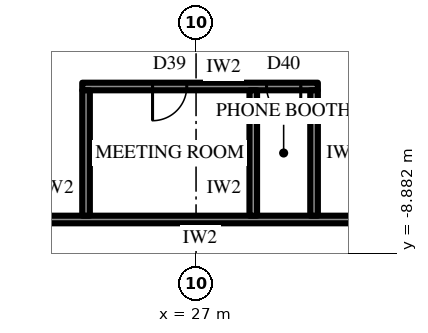
"""IFC4 building model, lengths in metres.
Left out: names, types, materials, properties, quantities, classifications, styles, units other than length and angle.
Written with IfcOpenShell. Run it as: python <this file> out.ifc"""

import sys

from ifc_helpers import new_model, si_unit, direction, frame, frame_2d, origin, place, context, subcontext, project, spatial, rectangle, extrude, element, fill, save


model = new_model("IFC4")
c1 = context("Model", 3, precision=1e-05, world=origin(), true_north=direction((0.0, 1.0)))
c2 = subcontext(c1, "Body", "Model", "MODEL_VIEW")
j1 = project(units=[si_unit("LENGTHUNIT", "METRE"), si_unit("PLANEANGLEUNIT", "RADIAN")], contexts=[c1])
p1 = place(None, origin())
s1 = spatial("IfcSite", under=j1, at=p1, CompositionType="ELEMENT")
p2 = place(p1, origin())
s2 = spatial("IfcBuilding", under=s1, at=p2, CompositionType="ELEMENT")
p3 = place(p2, frame((0.0, 0.0, 23.5)))
s3 = spatial("IfcBuildingStorey", under=s2, at=p3, CompositionType="ELEMENT", Elevation=23.5)
p4 = place(p3, frame((21.232, -30.925, 0.0), z_axis=(0.0, 0.0, 1.0), x_axis=(0.499999163675, 0.866025886636, 0.0)))
e1 = element("IfcWall", 1, at=p4, inside=s3, PredefinedType="SOLIDWALL", context=c2, shape_type="SweptSolid", body=[
    extrude(rectangle(XDim=32.332, YDim=0.3, at=frame_2d((16.166, 0.0))), origin(), (0.0, 0.0, 1.0), 2.7),
])
p5 = place(p4, frame((1.319, 0.0, 0.6)))
e2 = element("IfcOpeningElement", 2, at=p5, cuts=e1, PredefinedType="OPENING", context=c2, shape_type="SweptSolid", body=[
    extrude(rectangle(XDim=2.75, YDim=1.85, at=frame_2d((1.375, 0.925))), frame((0.0, 0.16, 0.0), z_axis=(0.0, -1.0, 0.0), x_axis=(1.0, 0.0, 0.0)), (0.0, 0.0, 1.0), 0.32),
])
p6 = place(p4, frame((6.708, 0.0, 0.6)))
e3 = element("IfcOpeningElement", 3, at=p6, cuts=e1, PredefinedType="OPENING", context=c2, shape_type="SweptSolid", body=[
    extrude(rectangle(XDim=2.75, YDim=1.85, at=frame_2d((1.375, 0.925))), frame((0.0, 0.16, 0.0), z_axis=(0.0, -1.0, 0.0), x_axis=(1.0, 0.0, 0.0)), (0.0, 0.0, 1.0), 0.32),
])
p7 = place(p4, frame((12.872, 0.0, 0.0)))
e4 = element("IfcOpeningElement", 4, at=p7, cuts=e1, PredefinedType="OPENING", context=c2, shape_type="SweptSolid", body=[
    extrude(rectangle(XDim=1.2, YDim=2.4, at=frame_2d((0.6, 1.2))), frame((0.0, 0.16, 0.0), z_axis=(0.0, -1.0, 0.0), x_axis=(1.0, 0.0, 0.0)), (0.0, 0.0, 1.0), 0.32),
])
p8 = place(p4, frame((17.485, 0.0, 0.6)))
e5 = element("IfcOpeningElement", 5, at=p8, cuts=e1, PredefinedType="OPENING", context=c2, shape_type="SweptSolid", body=[
    extrude(rectangle(XDim=2.75, YDim=1.85, at=frame_2d((1.375, 0.925))), frame((0.0, 0.16, 0.0), z_axis=(0.0, -1.0, 0.0), x_axis=(1.0, 0.0, 0.0)), (0.0, 0.0, 1.0), 0.32),
])
p9 = place(p4, frame((22.874, 0.0, 0.6)))
e6 = element("IfcOpeningElement", 6, at=p9, cuts=e1, PredefinedType="OPENING", context=c2, shape_type="SweptSolid", body=[
    extrude(rectangle(XDim=2.75, YDim=1.85, at=frame_2d((1.375, 0.925))), frame((0.0, 0.16, 0.0), z_axis=(0.0, -1.0, 0.0), x_axis=(1.0, 0.0, 0.0)), (0.0, 0.0, 1.0), 0.32),
])
p10 = place(p4, frame((28.262, 0.0, 0.6)))
e7 = element("IfcOpeningElement", 7, at=p10, cuts=e1, PredefinedType="OPENING", context=c2, shape_type="SweptSolid", body=[
    extrude(rectangle(XDim=2.75, YDim=1.85, at=frame_2d((1.375, 0.925))), frame((0.0, 0.16, 0.0), z_axis=(0.0, -1.0, 0.0), x_axis=(1.0, 0.0, 0.0)), (0.0, 0.0, 1.0), 0.32),
])
p11 = place(p3, frame((28.781, -41.95, 0.0), z_axis=(0.0, 0.0, 1.0), x_axis=(0.499998269459, 0.86602640291, 0.0)))
e8 = element("IfcWall", 8, at=p11, inside=s3, PredefinedType="PARAPET", context=c2, shape_type="SweptSolid", body=[
    extrude(rectangle(XDim=43.879, YDim=0.2, at=frame_2d((21.939, 0.0))), origin(), (0.0, 0.0, 1.0), 1.2),
])
p12 = place(p3, frame((21.1, -8.0, 0.0), z_axis=(0.0, 0.0, 1.0), x_axis=(1.0, 0.0, 0.0)))
e9 = element("IfcWall", 9, at=p12, inside=s3, PredefinedType="PARTITIONING", context=c2, shape_type="SweptSolid", body=[
    extrude(rectangle(XDim=12.011, YDim=0.2, at=frame_2d((6.005, 0.0))), origin(), (0.0, 0.0, 1.0), 4.0),
])
p13 = place(p12, frame((0.701, 0.0, 0.0)))
e10 = element("IfcOpeningElement", 10, at=p13, cuts=e9, PredefinedType="OPENING", context=c2, shape_type="SweptSolid", body=[
    extrude(rectangle(XDim=1.0, YDim=2.2, at=frame_2d((0.5, 1.1))), frame((0.0, 0.11, 0.0), z_axis=(0.0, -1.0, 0.0), x_axis=(1.0, 0.0, 0.0)), (0.0, 0.0, 1.0), 0.22),
])
p14 = place(p3, frame((24.005, -4.5, 0.0), z_axis=(0.0, 0.0, 1.0), x_axis=(1.0, 0.0, 0.0)))
e11 = element("IfcWall", 11, at=p14, inside=s3, PredefinedType="PARTITIONING", context=c2, shape_type="SweptSolid", body=[
    extrude(rectangle(XDim=6.2, YDim=0.2, at=frame_2d((3.1, 0.0))), origin(), (0.0, 0.0, 1.0), 4.0),
])
p15 = place(p14, frame((1.85, 0.0, 0.0)))
e12 = element("IfcOpeningElement", 12, at=p15, cuts=e11, PredefinedType="OPENING", context=c2, shape_type="SweptSolid", body=[
    extrude(rectangle(XDim=0.9, YDim=2.2, at=frame_2d((0.45, 1.1))), frame((0.0, 0.11, 0.0), z_axis=(0.0, -1.0, 0.0), x_axis=(1.0, 0.0, 0.0)), (0.0, 0.0, 1.0), 0.22),
])
p16 = place(p14, frame((4.85, 0.0, 0.0)))
e13 = element("IfcOpeningElement", 13, at=p16, cuts=e11, PredefinedType="OPENING", context=c2, shape_type="SweptSolid", body=[
    extrude(rectangle(XDim=0.9, YDim=2.2, at=frame_2d((0.45, 1.1))), frame((0.0, 0.11, 0.0), z_axis=(0.0, -1.0, 0.0), x_axis=(1.0, 0.0, 0.0)), (0.0, 0.0, 1.0), 0.22),
])
for number, where, z_axis, x_axis in (
    (14, (24.105, -7.9, 0.0), (0.0, 0.0, 1.0), (0.0, 1.0, 0.0)),
    (15, (28.505, -7.9, 0.0), (0.0, 0.0, 1.0), (0.0, 1.0, 0.0)),
    (16, (30.105, -7.9, 0.0), (0.0, 0.0, 1.0), (0.0, 1.0, 0.0)),
):
    element("IfcWall", number, at=place(p3, frame(where, z_axis=z_axis, x_axis=x_axis)), inside=s3, PredefinedType="PARTITIONING", context=c2, shape_type="SweptSolid", body=[
        extrude(rectangle(XDim=3.3, YDim=0.2, at=frame_2d((1.65, 0.0))), origin(), (0.0, 0.0, 1.0), 4.0),
    ])
p17 = place(p15, frame((0.9, 0.0, 0.0), z_axis=(0.0, 0.0, 1.0), x_axis=(-1.0, 0.0, 0.0)))
e17 = element("IfcDoor", 17, at=p17, inside=s3, OperationType="SINGLE_SWING_LEFT", PredefinedType="DOOR", context=c2, shape_type="SweptSolid", body=[
    extrude(rectangle(XDim=0.9, YDim=2.2, at=frame_2d((0.45, 1.1))), frame((0.0, 0.025, 0.0), z_axis=(0.0, -1.0, 0.0), x_axis=(1.0, 0.0, 0.0)), (0.0, 0.0, 1.0), 0.05),
])
fill(e12, e17)
p18 = place(p16, frame((0.9, 0.0, 0.0), z_axis=(0.0, 0.0, 1.0), x_axis=(-1.0, 0.0, 0.0)))
e18 = element("IfcDoor", 18, at=p18, inside=s3, OperationType="SINGLE_SWING_RIGHT", PredefinedType="DOOR", context=c2, shape_type="SweptSolid", body=[
    extrude(rectangle(XDim=0.9, YDim=2.2, at=frame_2d((0.45, 1.1))), frame((0.0, 0.025, 0.0), z_axis=(0.0, -1.0, 0.0), x_axis=(1.0, 0.0, 0.0)), (0.0, 0.0, 1.0), 0.05),
])
fill(e13, e18)
save(model, sys.argv[1])
